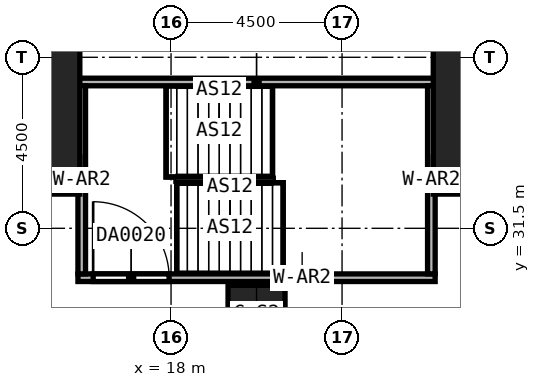
"""IFC4 building model, lengths in metres.
Left out: names, types, materials, properties, quantities, classifications, styles, units other than length and angle.
Written with IfcOpenShell. Run it as: python <this file> out.ifc"""

import sys

from ifc_helpers import new_model, si_unit, direction, frame, frame_2d, origin, origin_2d, place, context, subcontext, project, spatial, rectangle, extrude, element, fill, save


model = new_model("IFC4")
c1 = context("Model", 3, precision=1e-05, world=origin(), true_north=direction((0.0, 1.0)))
c2 = subcontext(c1, "Body", "Model", "MODEL_VIEW")
j1 = project(units=[si_unit("LENGTHUNIT", "METRE"), si_unit("PLANEANGLEUNIT", "RADIAN")], contexts=[c1])
p1 = place(None, origin())
s1 = spatial("IfcSite", under=j1, at=p1, CompositionType="ELEMENT")
p2 = place(p1, origin())
s2 = spatial("IfcBuilding", under=s1, at=p2, CompositionType="ELEMENT")
p3 = place(p2, frame((0.0, 0.0, 12.0)))
s3 = spatial("IfcBuildingStorey", under=s2, at=p3, CompositionType="ELEMENT", Elevation=12.0)
for number, where, z_axis, x_axis in (
    (1, (13.5, 35.7, 0.0), (0.0, 0.0, 1.0), (1.0, 0.0, 0.0)),
    (2, (27.0, 35.7, 0.0), (0.0, 0.0, 1.0), (1.0, 0.0, 0.0)),
):
    element("IfcColumn", number, at=place(p3, frame(where, z_axis=z_axis, x_axis=x_axis)), inside=s3, PredefinedType="COLUMN", context=c2, shape_type="SweptSolid", body=[
        extrude(rectangle(XDim=4.2, YDim=6.6, at=origin_2d()), origin(), (0.0, 0.0, 1.0), 7.0),
    ])
p4 = place(p3, frame((20.25, 29.25, 0.0), z_axis=(0.0, 0.0, 1.0), x_axis=(1.0, 0.0, 0.0)))
e3 = element("IfcColumn", 3, at=p4, inside=s3, PredefinedType="COLUMN", context=c2, shape_type="SweptSolid", body=[
    extrude(rectangle(XDim=1.5, YDim=1.5, at=origin_2d()), origin(), (0.0, 0.0, 1.0), 7.0),
])
p5 = place(p3, frame((15.55, 30.2, 0.0), z_axis=(0.0, 0.0, 1.0), x_axis=(1.0, 0.0, 0.0)))
e4 = element("IfcWall", 4, at=p5, inside=s3, PredefinedType="SOLIDWALL", context=c2, shape_type="SweptSolid", body=[
    extrude(rectangle(XDim=9.4, YDim=0.2, at=frame_2d((4.7, 0.0))), origin(), (0.0, 0.0, 1.0), 7.0),
])
p6 = place(p5, frame((0.4, 0.0, 0.0)))
e5 = element("IfcOpeningElement", 5, at=p6, cuts=e4, PredefinedType="OPENING", context=c2, shape_type="SweptSolid", body=[
    extrude(rectangle(XDim=2.0, YDim=2.4, at=frame_2d((1.0, 1.2))), frame((0.0, 0.1, 0.0), z_axis=(0.0, -1.0, 0.0), x_axis=(1.0, 0.0, 0.0)), (0.0, 0.0, 1.0), 0.2),
])
p7 = place(p3, frame((15.55, 35.35, 0.0), z_axis=(0.0, 0.0, 1.0), x_axis=(1.0, 0.0, 0.0)))
e6 = element("IfcWall", 6, at=p7, inside=s3, PredefinedType="SOLIDWALL", context=c2, shape_type="SweptSolid", body=[
    extrude(rectangle(XDim=9.4, YDim=0.2, at=frame_2d((4.7, 0.0))), origin(), (0.0, 0.0, 1.0), 7.0),
])
for number, where, z_axis, x_axis in (
    (7, (15.65, 30.3, 0.0), (0.0, 0.0, 1.0), (0.0, 1.0, 0.0)),
    (8, (24.85, 30.3, 0.0), (0.0, 0.0, 1.0), (0.0, 1.0, 0.0)),
):
    element("IfcWall", number, at=place(p3, frame(where, z_axis=z_axis, x_axis=x_axis)), inside=s3, PredefinedType="SOLIDWALL", context=c2, shape_type="SweptSolid", body=[
        extrude(rectangle(XDim=4.95, YDim=0.2, at=frame_2d((2.475, 0.0))), origin(), (0.0, 0.0, 1.0), 7.0),
    ])
p8 = place(p6, origin())
e9 = element("IfcDoor", 9, at=p8, inside=s3, OperationType="DOUBLE_DOOR_SINGLE_SWING", PredefinedType="DOOR", context=c2, shape_type="SweptSolid", body=[
    extrude(rectangle(XDim=2.0, YDim=2.4, at=frame_2d((1.0, 1.2))), frame((0.0, 0.025, 0.0), z_axis=(0.0, -1.0, 0.0), x_axis=(1.0, 0.0, 0.0)), (0.0, 0.0, 1.0), 0.05),
])
fill(e5, e9)
save(model, sys.argv[1])
